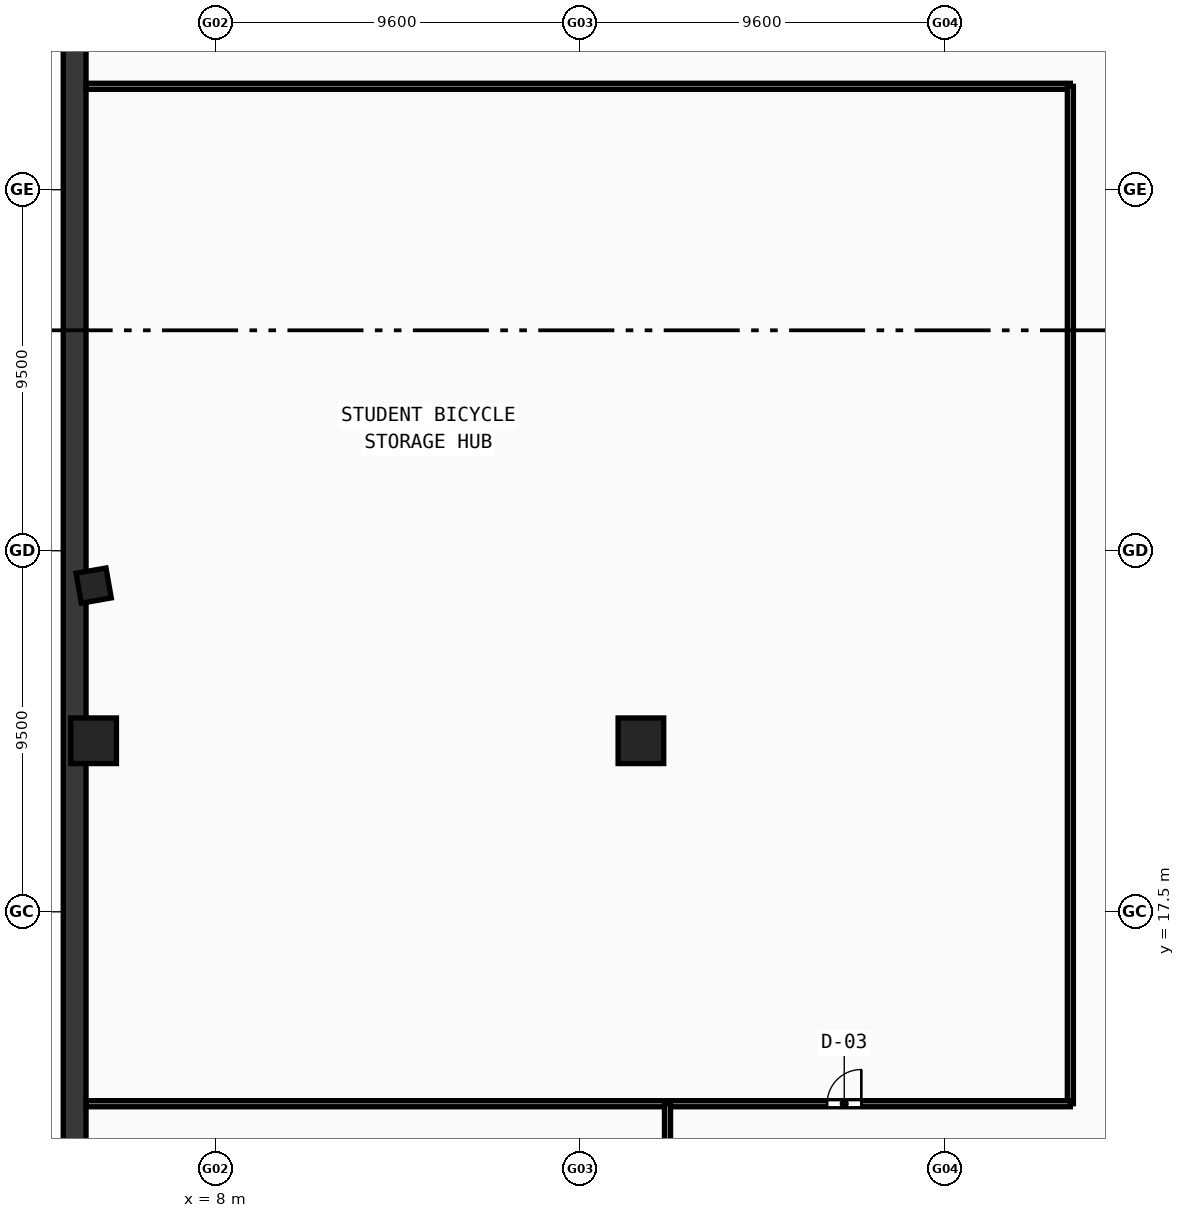
"""IFC4 building model, lengths in metres.
Left out: names, types, materials, properties, quantities, classifications, styles, units other than length and angle.
Written with IfcOpenShell. Run it as: python <this file> out.ifc"""

import sys

from ifc_helpers import new_model, si_unit, direction, frame, frame_2d, origin, origin_with_axes, origin_2d, place, context, subcontext, project, spatial, rectangle, hollow_rectangle, extrude, source, transform, mapped, element, fill, save


model = new_model("IFC4")
c1 = context("Model", 3, precision=1e-05, world=origin(), true_north=direction((0.0, 1.0)))
c2 = subcontext(c1, "Body", "Model", "MODEL_VIEW")
j1 = project(units=[si_unit("LENGTHUNIT", "METRE"), si_unit("PLANEANGLEUNIT", "RADIAN")], contexts=[c1])
p1 = place(None, origin())
s1 = spatial("IfcSite", under=j1, at=p1, CompositionType="ELEMENT")
p2 = place(p1, origin())
s2 = spatial("IfcBuilding", under=s1, at=p2, CompositionType="ELEMENT")
p3 = place(p2, frame((0.0, 0.0, -4.8)))
s3 = spatial("IfcBuildingStorey", under=s2, at=p3, CompositionType="ELEMENT", Elevation=-4.8)
p4 = place(p3, frame((4.3, 6.6, 0.0), z_axis=(0.0, 0.0, 1.0), x_axis=(0.0, 1.0, 0.0)))
e1 = element("IfcWall", 1, at=p4, inside=s3, PredefinedType="SHEAR", context=c2, shape_type="SweptSolid", body=[
    extrude(rectangle(XDim=82.8, YDim=0.6, at=frame_2d((41.4, 0.0))), origin(), (0.0, 0.0, 1.0), 4.52),
])
m1 = source(origin(), c2, "Body", "SweptSolid", [
    extrude(hollow_rectangle(XDim=1.2, YDim=1.2, WallThickness=0.05, at=origin_2d()), origin(), (0.0, 0.0, 1.0), 4.82),
])
for number, where, z_axis, x_axis in (
    (2, (4.8, 22.0, -0.3), (0.0, 0.0, 1.0), (1.0, 0.0, 0.0)),
    (3, (19.2, 22.0, -0.3), (0.0, 0.0, 1.0), (1.0, 0.0, 0.0)),
):
    element("IfcColumn", number, at=place(p3, frame(where, z_axis=z_axis, x_axis=x_axis)), inside=s3, PredefinedType="COLUMN", context=c2, shape_type="MappedRepresentation", body=[
        mapped(m1, transform((0.0, 0.0, 0.0), scale=1.0)),
    ])
m2 = source(origin(), c2, "Body", "SweptSolid", [
    extrude(hollow_rectangle(XDim=0.8, YDim=0.8, WallThickness=0.032, at=origin_2d()), origin(), (0.0, 0.0, 1.0), 4.82),
])
p5 = place(p3, frame((4.801, 26.083, -0.3), z_axis=(0.0, 0.0, 1.0), x_axis=(0.173648177667, -0.984807753012, 0.0)))
e4 = element("IfcColumn", 4, at=p5, inside=s3, PredefinedType="COLUMN", context=c2, shape_type="MappedRepresentation", body=[
    mapped(m2, transform((0.0, 0.0, 0.0), scale=1.0)),
])
p6 = place(p3, frame((4.6, 39.22, 0.0), z_axis=(0.0, 0.0, 1.0), x_axis=(1.0, 0.0, 0.0)))
e5 = element("IfcWall", 5, at=p6, inside=s3, PredefinedType="PARTITIONING", context=c2, shape_type="SweptSolid", body=[
    extrude(rectangle(XDim=25.9, YDim=0.16, at=frame_2d((12.95, 0.0))), origin(), (0.0, 0.0, 1.0), 3.62),
])
p7 = place(p3, frame((30.5, 12.45, 0.0), z_axis=(0.0, 0.0, 1.0), x_axis=(0.0, 1.0, 0.0)))
e6 = element("IfcWall", 6, at=p7, inside=s3, PredefinedType="PARTITIONING", context=c2, shape_type="SweptSolid", body=[
    extrude(rectangle(XDim=26.77, YDim=0.16, at=frame_2d((13.385, 0.0))), origin(), (0.0, 0.0, 1.0), 3.62),
])
p8 = place(p3, frame((4.6, 12.45, 0.0), z_axis=(0.0, 0.0, 1.0), x_axis=(1.0, 0.0, 0.0)))
e7 = element("IfcWall", 7, at=p8, inside=s3, PredefinedType="PARTITIONING", context=c2, shape_type="SweptSolid", body=[
    extrude(rectangle(XDim=25.9, YDim=0.16, at=frame_2d((12.95, 0.0))), origin(), (0.0, 0.0, 1.0), 3.62),
])
p9 = place(p8, frame((19.5, 0.0, 0.0)))
e8 = element("IfcOpeningElement", 8, at=p9, cuts=e7, PredefinedType="OPENING", context=c2, shape_type="SweptSolid", body=[
    extrude(rectangle(XDim=0.9, YDim=2.1, at=frame_2d((0.45, 1.05))), frame((0.0, 0.09, 0.0), z_axis=(0.0, -1.0, 0.0), x_axis=(1.0, 0.0, 0.0)), (0.0, 0.0, 1.0), 0.18),
])
p10 = place(p3, frame((19.9, 10.35, 0.0), z_axis=(0.0, 0.0, 1.0), x_axis=(0.0, 1.0, 0.0)))
e9 = element("IfcWall", 9, at=p10, inside=s3, PredefinedType="PARTITIONING", context=c2, shape_type="SweptSolid", body=[
    extrude(rectangle(XDim=2.1, YDim=0.16, at=frame_2d((1.05, 0.0))), origin(), (0.0, 0.0, 1.0), 4.52),
])
m3 = source(origin(), c2, "Body", "SweptSolid", [
    extrude(rectangle(XDim=0.9, YDim=2.1, at=frame_2d((0.45, 1.05))), frame((0.0, 0.025, 0.0), z_axis=(0.0, -1.0, 0.0), x_axis=(1.0, 0.0, 0.0)), (0.0, 0.0, 1.0), 0.05),
])
p11 = place(p9, origin_with_axes())
e10 = element("IfcDoor", 10, at=p11, inside=s3, OperationType="SINGLE_SWING_RIGHT", PredefinedType="DOOR", context=c2, shape_type="MappedRepresentation", body=[
    mapped(m3, transform((0.0, 0.0, 0.0), scale=1.0)),
])
fill(e8, e10)
save(model, sys.argv[1])
